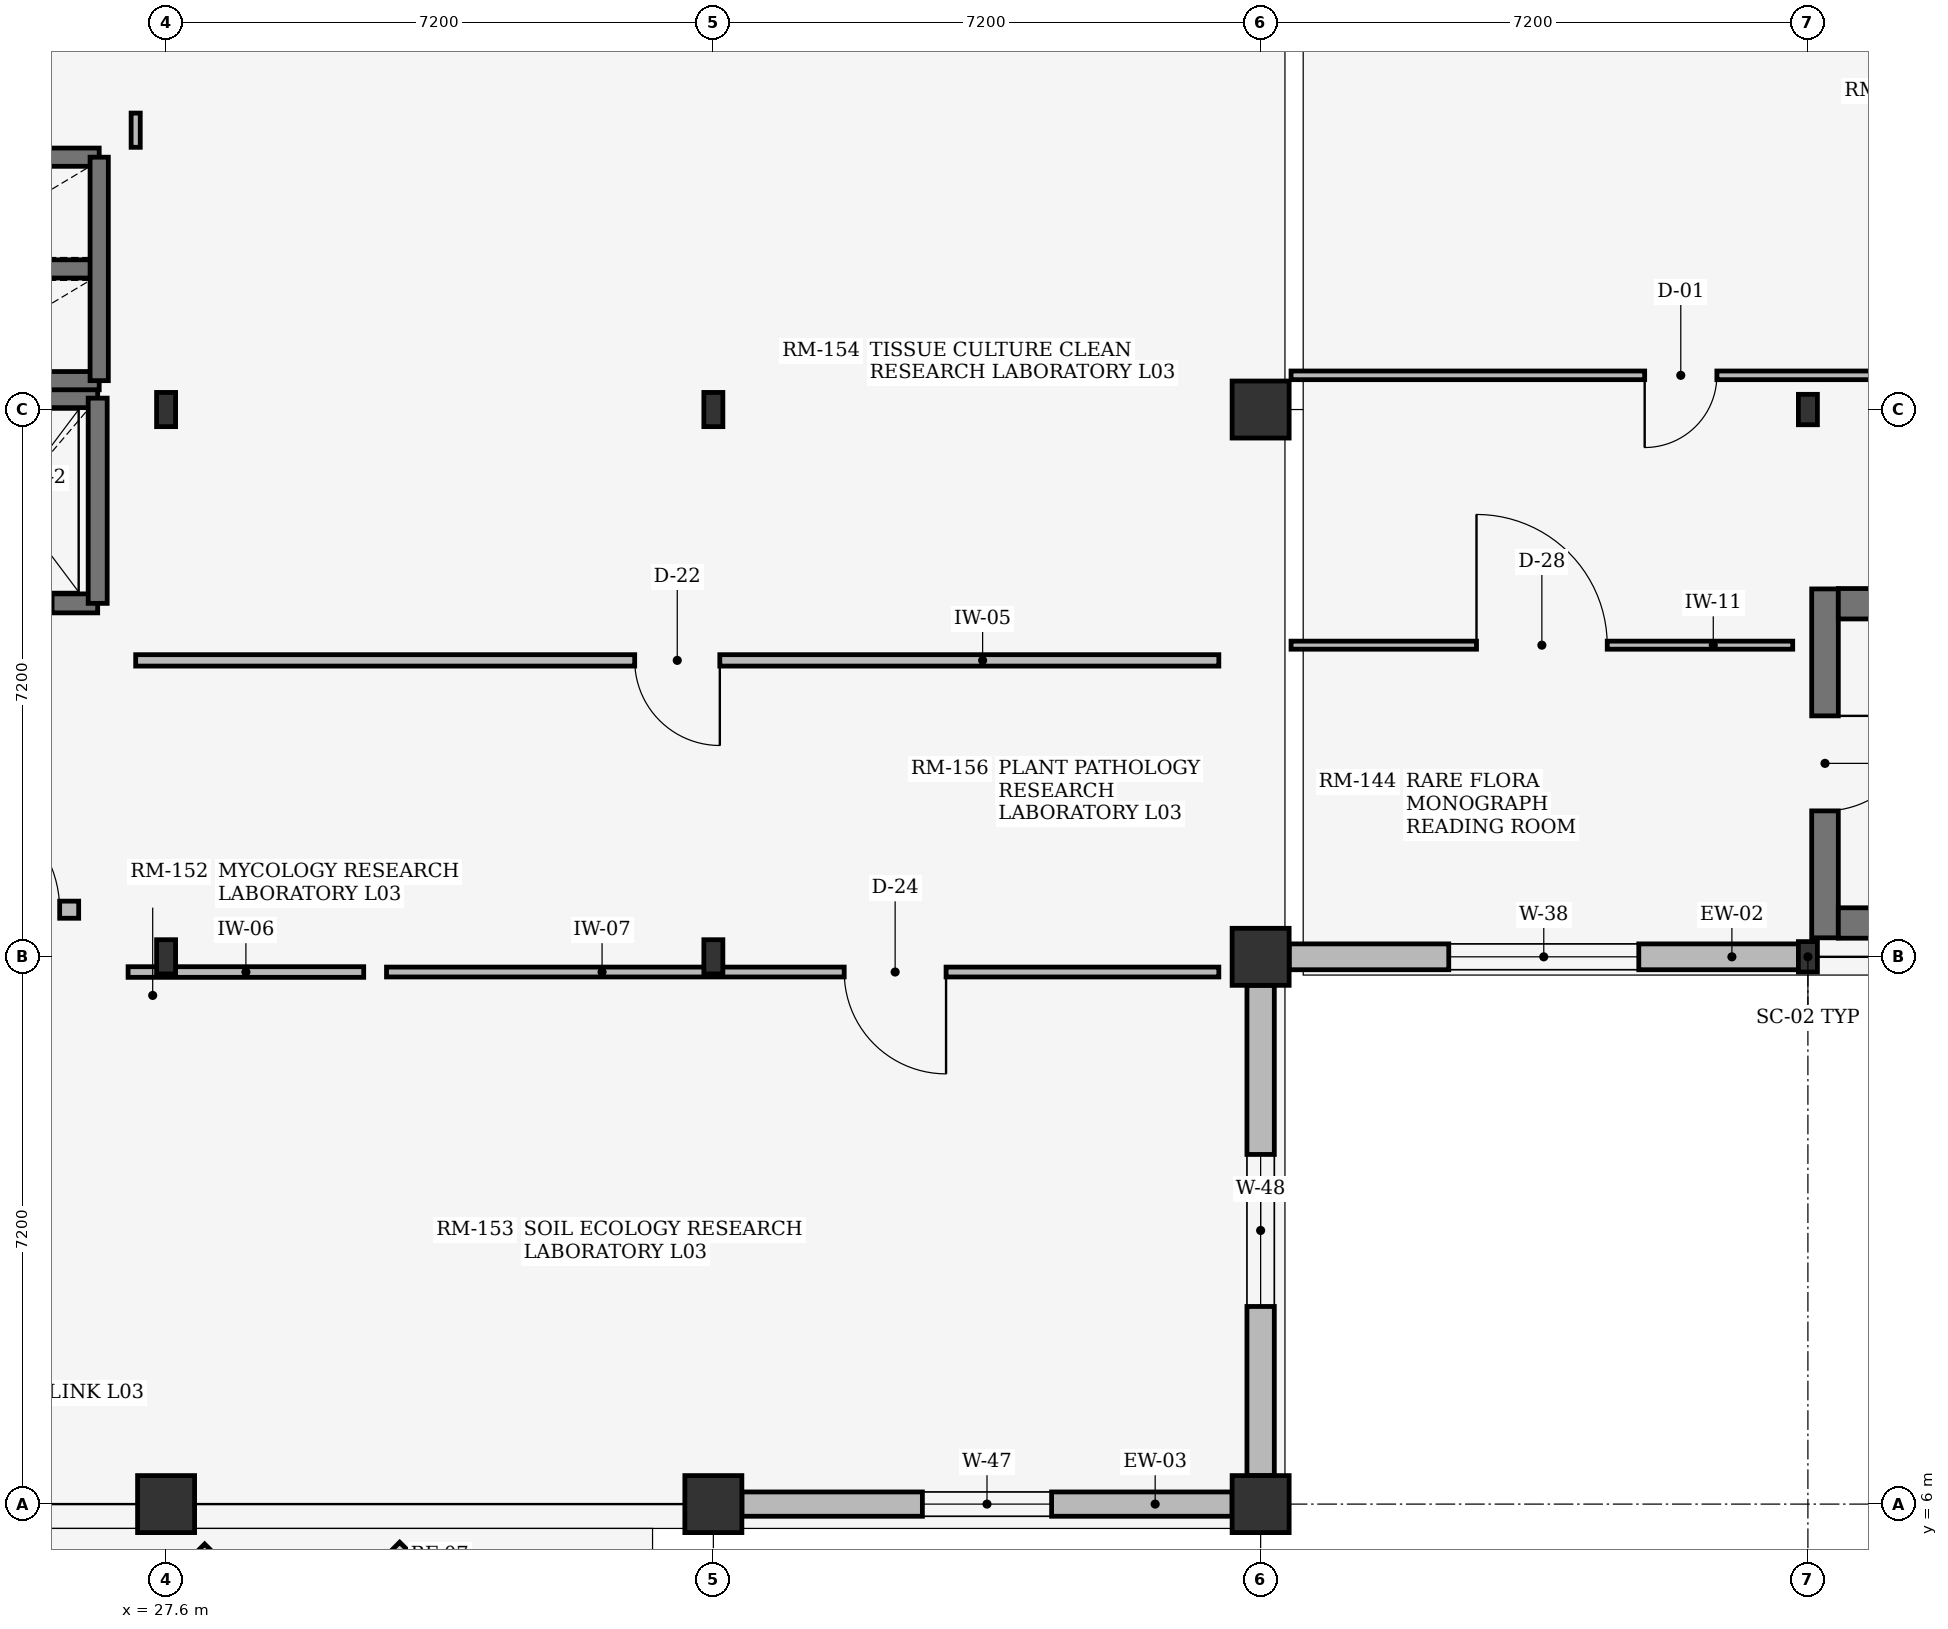
"""IFC4 building model, lengths in metres.
Left out: names, types, materials, properties, quantities, classifications, styles, units other than length and angle.
Written with IfcOpenShell. Run it as: python <this file> out.ifc"""

import sys

from ifc_helpers import new_model, si_unit, direction, frame, frame_2d, origin, origin_2d, place, context, subcontext, project, spatial, rectangle, i_section, extrude, element, fill, save


model = new_model("IFC4")
c1 = context("Model", 3, precision=1e-05, world=origin(), true_north=direction((0.0, 1.0)))
c2 = subcontext(c1, "Body", "Model", "MODEL_VIEW")
j1 = project(units=[si_unit("LENGTHUNIT", "METRE"), si_unit("PLANEANGLEUNIT", "RADIAN")], contexts=[c1])
p1 = place(None, origin())
s1 = spatial("IfcSite", under=j1, at=p1, CompositionType="ELEMENT")
p2 = place(p1, origin())
s2 = spatial("IfcBuilding", under=s1, at=p2, CompositionType="ELEMENT")
p3 = place(p2, frame((0.0, 0.0, 13.2)))
s3 = spatial("IfcBuildingStorey", under=s2, at=p3, CompositionType="ELEMENT", Elevation=13.2)
p4 = place(p3, frame((27.6, 6.0, 0.0), z_axis=(0.0, 0.0, 1.0), x_axis=(1.0, 0.0, 0.0)))
e1 = element("IfcColumn", 1, at=p4, inside=s3, PredefinedType="COLUMN", context=c2, shape_type="SweptSolid", body=[
    extrude(rectangle(XDim=0.75, YDim=0.75, at=origin_2d()), origin(), (0.0, 0.0, 1.0), 3.635),
])
for number, where, z_axis, x_axis in (
    (2, (27.6, 13.2, 0.0), (0.0, 0.0, 1.0), (1.0, 0.0, 0.0)),
    (3, (27.6, 20.4, 0.0), (0.0, 0.0, 1.0), (1.0, 0.0, 0.0)),
):
    element("IfcColumn", number, at=place(p3, frame(where, z_axis=z_axis, x_axis=x_axis)), inside=s3, PredefinedType="COLUMN", context=c2, shape_type="SweptSolid", body=[
        extrude(i_section(OverallWidth=0.25, OverallDepth=0.45, WebThickness=0.011, FlangeThickness=0.014, at=origin_2d()), origin(), (0.0, 0.0, 1.0), 3.635),
    ])
p5 = place(p3, frame((34.8, 6.0, 0.0), z_axis=(0.0, 0.0, 1.0), x_axis=(1.0, 0.0, 0.0)))
e4 = element("IfcColumn", 4, at=p5, inside=s3, PredefinedType="COLUMN", context=c2, shape_type="SweptSolid", body=[
    extrude(rectangle(XDim=0.75, YDim=0.75, at=origin_2d()), origin(), (0.0, 0.0, 1.0), 3.635),
])
for number, where, z_axis, x_axis in (
    (5, (34.8, 13.2, 0.0), (0.0, 0.0, 1.0), (1.0, 0.0, 0.0)),
    (6, (34.8, 20.4, 0.0), (0.0, 0.0, 1.0), (1.0, 0.0, 0.0)),
):
    element("IfcColumn", number, at=place(p3, frame(where, z_axis=z_axis, x_axis=x_axis)), inside=s3, PredefinedType="COLUMN", context=c2, shape_type="SweptSolid", body=[
        extrude(i_section(OverallWidth=0.25, OverallDepth=0.45, WebThickness=0.011, FlangeThickness=0.014, at=origin_2d()), origin(), (0.0, 0.0, 1.0), 3.635),
    ])
for number, where, z_axis, x_axis in (
    (7, (42.0, 6.0, 0.0), (0.0, 0.0, 1.0), (1.0, 0.0, 0.0)),
    (8, (42.0, 13.2, 0.0), (0.0, 0.0, 1.0), (1.0, 0.0, 0.0)),
    (9, (42.0, 20.4, 0.0), (0.0, 0.0, 1.0), (1.0, 0.0, 0.0)),
):
    element("IfcColumn", number, at=place(p3, frame(where, z_axis=z_axis, x_axis=x_axis)), inside=s3, PredefinedType="COLUMN", context=c2, shape_type="SweptSolid", body=[
        extrude(rectangle(XDim=0.75, YDim=0.75, at=origin_2d()), origin(), (0.0, 0.0, 1.0), 3.635),
    ])
for number, where, z_axis, x_axis in (
    (10, (49.2, 13.2, 0.0), (0.0, 0.0, 1.0), (1.0, 0.0, 0.0)),
    (11, (49.2, 20.4, 0.0), (0.0, 0.0, 1.0), (1.0, 0.0, 0.0)),
):
    element("IfcColumn", number, at=place(p3, frame(where, z_axis=z_axis, x_axis=x_axis)), inside=s3, PredefinedType="COLUMN", context=c2, shape_type="SweptSolid", body=[
        extrude(i_section(OverallWidth=0.25, OverallDepth=0.4, WebThickness=0.01, FlangeThickness=0.013, at=origin_2d()), origin(), (0.0, 0.0, 1.0), 3.625),
    ])
p6 = place(p3, frame((42.375, 13.2, 0.0), z_axis=(0.0, 0.0, 1.0), x_axis=(1.0, 0.0, 0.0)))
e12 = element("IfcWall", 12, at=p6, inside=s3, PredefinedType="STANDARD", context=c2, shape_type="SweptSolid", body=[
    extrude(rectangle(XDim=6.7, YDim=0.34, at=frame_2d((3.35, 0.0))), origin(), (0.0, 0.0, 1.0), 3.1),
])
p7 = place(p6, frame((2.1, 0.0, 0.75)))
e13 = element("IfcOpeningElement", 13, at=p7, cuts=e12, PredefinedType="OPENING", context=c2, shape_type="SweptSolid", body=[
    extrude(rectangle(XDim=2.5, YDim=1.35, at=frame_2d((1.25, 0.675))), frame((0.0, 0.18, 0.0), z_axis=(0.0, -1.0, 0.0), x_axis=(1.0, 0.0, 0.0)), (0.0, 0.0, 1.0), 0.36),
])
p8 = place(p3, frame((35.175, 6.0, 0.0), z_axis=(0.0, 0.0, 1.0), x_axis=(1.0, 0.0, 0.0)))
e14 = element("IfcWall", 14, at=p8, inside=s3, PredefinedType="STANDARD", context=c2, shape_type="SweptSolid", body=[
    extrude(rectangle(XDim=6.45, YDim=0.32, at=frame_2d((3.225, 0.0))), origin(), (0.0, 0.0, 1.0), 3.015),
])
p9 = place(p8, frame((2.375, 0.0, 0.75)))
e15 = element("IfcOpeningElement", 15, at=p9, cuts=e14, PredefinedType="OPENING", context=c2, shape_type="SweptSolid", body=[
    extrude(rectangle(XDim=1.7, YDim=1.25, at=frame_2d((0.85, 0.625))), frame((0.0, 0.17, 0.0), z_axis=(0.0, -1.0, 0.0), x_axis=(1.0, 0.0, 0.0)), (0.0, 0.0, 1.0), 0.34),
])
p10 = place(p3, frame((42.0, 6.375, 0.0), z_axis=(0.0, 0.0, 1.0), x_axis=(0.0, 1.0, 0.0)))
e16 = element("IfcWall", 16, at=p10, inside=s3, PredefinedType="STANDARD", context=c2, shape_type="SweptSolid", body=[
    extrude(rectangle(XDim=6.45, YDim=0.36, at=frame_2d((3.225, 0.0))), origin(), (0.0, 0.0, 1.0), 3.015),
])
p11 = place(p10, frame((2.225, 0.0, 0.75)))
e17 = element("IfcOpeningElement", 17, at=p11, cuts=e16, PredefinedType="OPENING", context=c2, shape_type="SweptSolid", body=[
    extrude(rectangle(XDim=2.0, YDim=1.25, at=frame_2d((1.0, 0.625))), frame((0.0, 0.19, 0.0), z_axis=(0.0, -1.0, 0.0), x_axis=(1.0, 0.0, 0.0)), (0.0, 0.0, 1.0), 0.38),
])
p12 = place(p3, frame((49.425, 13.45, 0.0), z_axis=(0.0, 0.0, 1.0), x_axis=(0.0, 1.0, 0.0)))
e18 = element("IfcWall", 18, at=p12, inside=s3, PredefinedType="SHEAR", context=c2, shape_type="SweptSolid", body=[
    extrude(rectangle(XDim=4.59, YDim=0.35, at=frame_2d((2.295, 0.0))), origin(), (0.0, 0.0, 1.0), 3.625),
])
p13 = place(p12, frame((1.67, 0.0, 0.0)))
e19 = element("IfcOpeningElement", 19, at=p13, cuts=e18, PredefinedType="OPENING", context=c2, shape_type="SweptSolid", body=[
    extrude(rectangle(XDim=1.25, YDim=2.2, at=frame_2d((0.625, 1.1))), frame((0.0, 0.185, 0.0), z_axis=(0.0, -1.0, 0.0), x_axis=(1.0, 0.0, 0.0)), (0.0, 0.0, 1.0), 0.37),
])
for number, where, z_axis, x_axis in (
    (20, (49.6, 13.645, 0.0), (0.0, 0.0, 1.0), (1.0, 0.0, 0.0)),
    (21, (49.6, 17.845, 0.0), (0.0, 0.0, 1.0), (1.0, 0.0, 0.0)),
):
    element("IfcWall", number, at=place(p3, frame(where, z_axis=z_axis, x_axis=x_axis)), inside=s3, PredefinedType="SHEAR", context=c2, shape_type="SweptSolid", body=[
        extrude(rectangle(XDim=7.98, YDim=0.4, at=frame_2d((3.99, 0.0))), origin(), (0.0, 0.0, 1.0), 3.625),
    ])
p14 = place(p3, frame((24.4, 17.85, 0.0), z_axis=(0.0, 0.0, 1.0), x_axis=(1.0, 0.0, 0.0)))
e22 = element("IfcWall", 22, at=p14, inside=s3, PredefinedType="SHEAR", context=c2, shape_type="SweptSolid", body=[
    extrude(rectangle(XDim=2.3, YDim=0.25, at=frame_2d((1.15, 0.0))), origin(), (0.0, 0.0, 1.0), 3.635),
])
p15 = place(p14, frame((0.6, 0.0, 0.0)))
e23 = element("IfcOpeningElement", 23, at=p15, cuts=e22, PredefinedType="OPENING", context=c2, shape_type="SweptSolid", body=[
    extrude(rectangle(XDim=1.1, YDim=2.2, at=frame_2d((0.55, 1.1))), frame((0.0, 0.135, 0.0), z_axis=(0.0, -1.0, 0.0), x_axis=(1.0, 0.0, 0.0)), (0.0, 0.0, 1.0), 0.27),
])
p16 = place(p3, frame((24.4, 20.55, 0.0), z_axis=(0.0, 0.0, 1.0), x_axis=(1.0, 0.0, 0.0)))
e24 = element("IfcWall", 24, at=p16, inside=s3, PredefinedType="SHEAR", context=c2, shape_type="SweptSolid", body=[
    extrude(rectangle(XDim=2.3, YDim=0.25, at=frame_2d((1.15, 0.0))), origin(), (0.0, 0.0, 1.0), 3.635),
])
p17 = place(p3, frame((26.7, 17.85, 0.0), z_axis=(0.0, 0.0, 1.0), x_axis=(0.0, 1.0, 0.0)))
e25 = element("IfcWall", 25, at=p17, inside=s3, PredefinedType="SHEAR", context=c2, shape_type="SweptSolid", body=[
    extrude(rectangle(XDim=2.7, YDim=0.25, at=frame_2d((1.35, 0.0))), origin(), (0.0, 0.0, 1.0), 3.635),
])
for number, where, z_axis, x_axis in (
    (26, (24.48, 20.78, 0.0), (0.0, 0.0, 1.0), (1.0, 0.0, 0.0)),
    (27, (24.48, 22.25, 0.0), (0.0, 0.0, 1.0), (1.0, 0.0, 0.0)),
    (28, (24.48, 23.72, 0.0), (0.0, 0.0, 1.0), (1.0, 0.0, 0.0)),
):
    element("IfcWall", number, at=place(p3, frame(where, z_axis=z_axis, x_axis=x_axis)), inside=s3, PredefinedType="SHEAR", context=c2, shape_type="SweptSolid", body=[
        extrude(rectangle(XDim=2.24, YDim=0.24, at=frame_2d((1.12, 0.0))), origin(), (0.0, 0.0, 1.0), 3.635),
    ])
p18 = place(p3, frame((26.72, 20.78, 0.0), z_axis=(0.0, 0.0, 1.0), x_axis=(0.0, 1.0, 0.0)))
e29 = element("IfcWall", 29, at=p18, inside=s3, PredefinedType="SHEAR", context=c2, shape_type="SweptSolid", body=[
    extrude(rectangle(XDim=2.94, YDim=0.24, at=frame_2d((1.47, 0.0))), origin(), (0.0, 0.0, 1.0), 3.635),
])
p19 = place(p3, frame((24.45, 13.82, 0.0), z_axis=(0.0, 0.0, 1.0), x_axis=(1.0, 0.0, 0.0)))
e30 = element("IfcWall", 30, at=p19, inside=s3, PredefinedType="SOLIDWALL", context=c2, shape_type="SweptSolid", body=[
    extrude(rectangle(XDim=2.0, YDim=0.225, at=frame_2d((1.0, 0.0))), origin(), (0.0, 0.0, 1.0), 3.615),
])
p20 = place(p19, frame((0.25, 0.0, 0.0)))
e31 = element("IfcOpeningElement", 31, at=p20, cuts=e30, PredefinedType="OPENING", context=c2, shape_type="SweptSolid", body=[
    extrude(rectangle(XDim=1.5, YDim=2.2, at=frame_2d((0.75, 1.1))), frame((0.0, 0.123, 0.0), z_axis=(0.0, -1.0, 0.0), x_axis=(1.0, 0.0, 0.0)), (0.0, 0.0, 1.0), 0.245),
])
p21 = place(p3, frame((27.2, 17.1, 0.0), z_axis=(0.0, 0.0, 1.0), x_axis=(1.0, 0.0, 0.0)))
e32 = element("IfcWall", 32, at=p21, inside=s3, PredefinedType="PARTITIONING", context=c2, shape_type="SweptSolid", body=[
    extrude(rectangle(XDim=14.25, YDim=0.15, at=frame_2d((7.125, 0.0))), origin(), (0.0, 0.0, 1.0), 3.615),
])
p22 = place(p21, frame((6.565, 0.0, 0.0)))
e33 = element("IfcOpeningElement", 33, at=p22, cuts=e32, PredefinedType="OPENING", context=c2, shape_type="SweptSolid", body=[
    extrude(rectangle(XDim=1.12, YDim=2.22, at=frame_2d((0.56, 1.11))), frame((0.0, 0.085, 0.0), z_axis=(0.0, -1.0, 0.0), x_axis=(1.0, 0.0, 0.0)), (0.0, 0.0, 1.0), 0.17),
])
p23 = place(p3, frame((27.1, 13.0, 0.0), z_axis=(0.0, 0.0, 1.0), x_axis=(1.0, 0.0, 0.0)))
e34 = element("IfcWall", 34, at=p23, inside=s3, PredefinedType="PARTITIONING", context=c2, shape_type="SweptSolid", body=[
    extrude(rectangle(XDim=3.1, YDim=0.14, at=frame_2d((1.55, 0.0))), origin(), (0.0, 0.0, 1.0), 3.615),
])
p24 = place(p3, frame((30.5, 13.0, 0.0), z_axis=(0.0, 0.0, 1.0), x_axis=(1.0, 0.0, 0.0)))
e35 = element("IfcWall", 35, at=p24, inside=s3, PredefinedType="PARTITIONING", context=c2, shape_type="SweptSolid", body=[
    extrude(rectangle(XDim=10.95, YDim=0.13, at=frame_2d((5.475, 0.0))), origin(), (0.0, 0.0, 1.0), 3.615),
])
p25 = place(p24, frame((6.021, 0.0, 0.0)))
e36 = element("IfcOpeningElement", 36, at=p25, cuts=e35, PredefinedType="OPENING", context=c2, shape_type="SweptSolid", body=[
    extrude(rectangle(XDim=1.34, YDim=2.22, at=frame_2d((0.67, 1.11))), frame((0.0, 0.075, 0.0), z_axis=(0.0, -1.0, 0.0), x_axis=(1.0, 0.0, 0.0)), (0.0, 0.0, 1.0), 0.15),
])
p26 = place(p3, frame((27.2, 24.3, 0.0), z_axis=(0.0, 0.0, 1.0), x_axis=(0.0, -1.0, 0.0)))
e37 = element("IfcWall", 37, at=p26, inside=s3, PredefinedType="PARTITIONING", context=c2, shape_type="SweptSolid", body=[
    extrude(rectangle(XDim=0.45, YDim=0.12, at=frame_2d((0.225, 0.0))), origin(), (0.0, 0.0, 1.0), 3.615),
])
p27 = place(p3, frame((42.4, 17.3, 0.0), z_axis=(0.0, 0.0, 1.0), x_axis=(1.0, 0.0, 0.0)))
e38 = element("IfcWall", 38, at=p27, inside=s3, PredefinedType="PARTITIONING", context=c2, shape_type="SweptSolid", body=[
    extrude(rectangle(XDim=6.6, YDim=0.106, at=frame_2d((3.3, 0.0))), origin(), (0.0, 0.0, 1.0), 3.615),
])
p28 = place(p27, frame((2.44, 0.0, 0.0)))
e39 = element("IfcOpeningElement", 39, at=p28, cuts=e38, PredefinedType="OPENING", context=c2, shape_type="SweptSolid", body=[
    extrude(rectangle(XDim=1.72, YDim=2.32, at=frame_2d((0.86, 1.16))), frame((0.0, 0.063, 0.0), z_axis=(0.0, -1.0, 0.0), x_axis=(1.0, 0.0, 0.0)), (0.0, 0.0, 1.0), 0.126),
])
p29 = place(p3, frame((42.4, 20.85, 0.0), z_axis=(0.0, 0.0, 1.0), x_axis=(1.0, 0.0, 0.0)))
e40 = element("IfcWall", 40, at=p29, inside=s3, PredefinedType="PARTITIONING", context=c2, shape_type="SweptSolid", body=[
    extrude(rectangle(XDim=13.6, YDim=0.114, at=frame_2d((6.8, 0.0))), origin(), (0.0, 0.0, 1.0), 3.615),
])
p30 = place(p29, frame((4.653, 0.0, 0.0)))
e41 = element("IfcOpeningElement", 41, at=p30, cuts=e40, PredefinedType="OPENING", context=c2, shape_type="SweptSolid", body=[
    extrude(rectangle(XDim=0.95, YDim=2.15, at=frame_2d((0.475, 1.075))), frame((0.0, 0.067, 0.0), z_axis=(0.0, -1.0, 0.0), x_axis=(1.0, 0.0, 0.0)), (0.0, 0.0, 1.0), 0.134),
])
p31 = place(p7, origin())
e42 = element("IfcWindow", 42, at=p31, inside=s3, PartitioningType="SINGLE_PANEL", PredefinedType="WINDOW", context=c2, shape_type="SweptSolid", body=[
    extrude(rectangle(XDim=2.5, YDim=1.35, at=frame_2d((1.25, 0.675))), frame((0.0, 0.03, 0.0), z_axis=(0.0, -1.0, 0.0), x_axis=(1.0, 0.0, 0.0)), (0.0, 0.0, 1.0), 0.06),
])
fill(e13, e42)
p32 = place(p9, origin())
e43 = element("IfcWindow", 43, at=p32, inside=s3, PartitioningType="SINGLE_PANEL", PredefinedType="WINDOW", context=c2, shape_type="SweptSolid", body=[
    extrude(rectangle(XDim=1.7, YDim=1.25, at=frame_2d((0.85, 0.625))), frame((0.0, 0.03, 0.0), z_axis=(0.0, -1.0, 0.0), x_axis=(1.0, 0.0, 0.0)), (0.0, 0.0, 1.0), 0.06),
])
fill(e15, e43)
p33 = place(p11, origin())
e44 = element("IfcWindow", 44, at=p33, inside=s3, PartitioningType="SINGLE_PANEL", PredefinedType="WINDOW", context=c2, shape_type="SweptSolid", body=[
    extrude(rectangle(XDim=2.0, YDim=1.25, at=frame_2d((1.0, 0.625))), frame((0.0, 0.03, 0.0), z_axis=(0.0, -1.0, 0.0), x_axis=(1.0, 0.0, 0.0)), (0.0, 0.0, 1.0), 0.06),
])
fill(e17, e44)
p34 = place(p13, origin())
e45 = element("IfcDoor", 45, at=p34, inside=s3, OperationType="SINGLE_SWING_RIGHT", PredefinedType="DOOR", context=c2, shape_type="SweptSolid", body=[
    extrude(rectangle(XDim=1.25, YDim=2.2, at=frame_2d((0.625, 1.1))), frame((0.0, 0.025, 0.0), z_axis=(0.0, -1.0, 0.0), x_axis=(1.0, 0.0, 0.0)), (0.0, 0.0, 1.0), 0.05),
])
fill(e19, e45)
p35 = place(p20, origin())
e46 = element("IfcDoor", 46, at=p35, inside=s3, OperationType="SINGLE_SWING_LEFT", PredefinedType="DOOR", context=c2, shape_type="SweptSolid", body=[
    extrude(rectangle(XDim=1.5, YDim=2.2, at=frame_2d((0.75, 1.1))), frame((0.0, 0.025, 0.0), z_axis=(0.0, -1.0, 0.0), x_axis=(1.0, 0.0, 0.0)), (0.0, 0.0, 1.0), 0.05),
])
fill(e31, e46)
p36 = place(p22, origin())
e47 = element("IfcDoor", 47, at=p36, inside=s3, OperationType="SINGLE_SWING_RIGHT", PredefinedType="DOOR", context=c2, shape_type="SweptSolid", body=[
    extrude(rectangle(XDim=1.12, YDim=2.22, at=frame_2d((0.56, 1.11))), frame((0.0, 0.025, 0.0), z_axis=(0.0, -1.0, 0.0), x_axis=(1.0, 0.0, 0.0)), (0.0, 0.0, 1.0), 0.05),
])
fill(e33, e47)
p37 = place(p25, origin())
e48 = element("IfcDoor", 48, at=p37, inside=s3, OperationType="SINGLE_SWING_RIGHT", PredefinedType="DOOR", context=c2, shape_type="SweptSolid", body=[
    extrude(rectangle(XDim=1.34, YDim=2.22, at=frame_2d((0.67, 1.11))), frame((0.0, 0.025, 0.0), z_axis=(0.0, -1.0, 0.0), x_axis=(1.0, 0.0, 0.0)), (0.0, 0.0, 1.0), 0.05),
])
fill(e36, e48)
p38 = place(p28, origin())
e49 = element("IfcDoor", 49, at=p38, inside=s3, OperationType="DOUBLE_DOOR_SINGLE_SWING", PredefinedType="DOOR", context=c2, shape_type="SweptSolid", body=[
    extrude(rectangle(XDim=1.72, YDim=2.32, at=frame_2d((0.86, 1.16))), frame((0.0, 0.025, 0.0), z_axis=(0.0, -1.0, 0.0), x_axis=(1.0, 0.0, 0.0)), (0.0, 0.0, 1.0), 0.05),
])
fill(e39, e49)
p39 = place(p30, frame((0.95, 0.0, 0.0), z_axis=(0.0, 0.0, 1.0), x_axis=(-1.0, 0.0, 0.0)))
e50 = element("IfcDoor", 50, at=p39, inside=s3, OperationType="SINGLE_SWING_LEFT", PredefinedType="DOOR", context=c2, shape_type="SweptSolid", body=[
    extrude(rectangle(XDim=0.95, YDim=2.15, at=frame_2d((0.475, 1.075))), frame((0.0, 0.025, 0.0), z_axis=(0.0, -1.0, 0.0), x_axis=(1.0, 0.0, 0.0)), (0.0, 0.0, 1.0), 0.05),
])
fill(e41, e50)
save(model, sys.argv[1])
